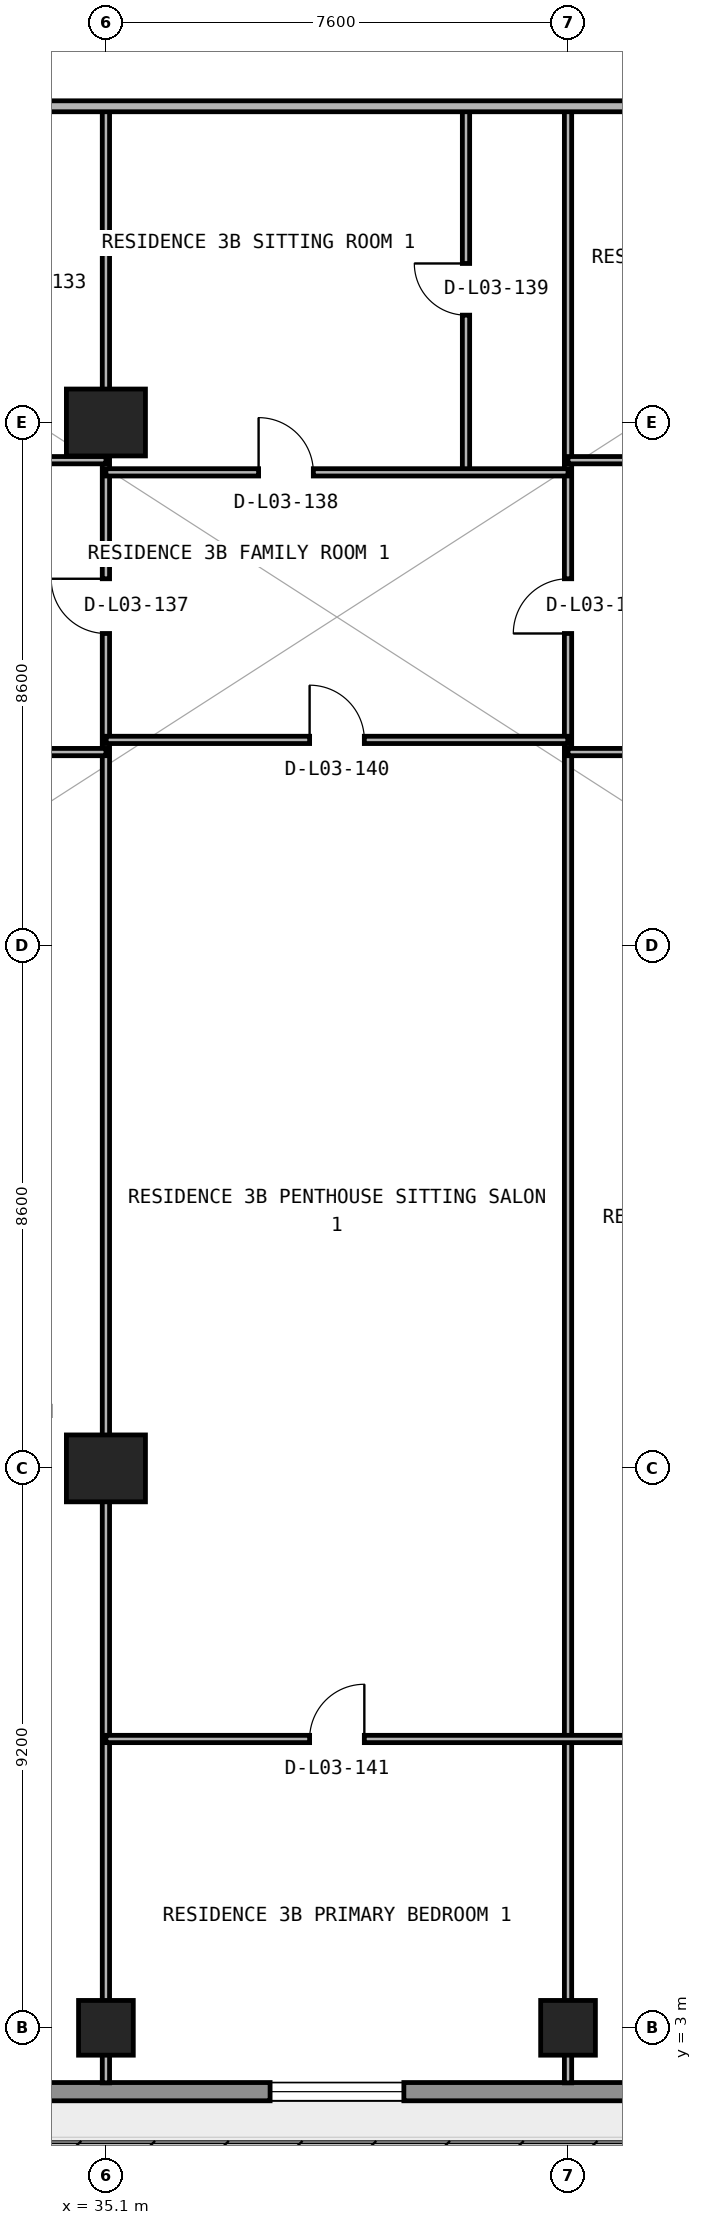
"""IFC4 building model, lengths in metres.
Left out: names, types, materials, properties, quantities, classifications, styles, units other than length and angle.
Written with IfcOpenShell. Run it as: python <this file> out.ifc"""

import sys

from ifc_helpers import new_model, si_unit, direction, frame, frame_2d, origin, origin_2d, place, context, subcontext, project, spatial, rectangle, circle, extrude, element, fill, save


model = new_model("IFC4")
c1 = context("Model", 3, precision=1e-05, world=origin(), true_north=direction((0.0, 1.0)))
c2 = subcontext(c1, "Body", "Model", "MODEL_VIEW")
j1 = project(units=[si_unit("LENGTHUNIT", "METRE"), si_unit("PLANEANGLEUNIT", "RADIAN")], contexts=[c1])
p1 = place(None, origin())
s1 = spatial("IfcSite", under=j1, at=p1, CompositionType="ELEMENT")
p2 = place(p1, origin())
s2 = spatial("IfcBuilding", under=s1, at=p2, CompositionType="ELEMENT")
p3 = place(p2, frame((0.0, 0.0, 15.0)))
s3 = spatial("IfcBuildingStorey", under=s2, at=p3, CompositionType="ELEMENT", Elevation=15.0)
for number, where, z_axis, x_axis in (
    (1, (35.1, 3.0, 0.0), (0.0, 0.0, 1.0), (1.0, 0.0, 0.0)),
    (2, (42.7, 3.0, 0.0), (0.0, 0.0, 1.0), (1.0, 0.0, 0.0)),
):
    element("IfcColumn", number, at=place(p3, frame(where, z_axis=z_axis, x_axis=x_axis)), inside=s3, PredefinedType="COLUMN", context=c2, shape_type="SweptSolid", body=[
        extrude(circle(Radius=0.45, at=origin_2d()), origin(), (0.0, 0.0, 1.0), 4.5),
    ])
for number, where, z_axis, x_axis in (
    (3, (35.1, 12.2, 0.0), (0.0, 0.0, 1.0), (1.0, 0.0, 0.0)),
    (4, (35.1, 29.4, 0.0), (0.0, 0.0, 1.0), (1.0, 0.0, 0.0)),
):
    element("IfcColumn", number, at=place(p3, frame(where, z_axis=z_axis, x_axis=x_axis)), inside=s3, PredefinedType="COLUMN", context=c2, shape_type="SweptSolid", body=[
        extrude(rectangle(XDim=1.3, YDim=1.1, at=origin_2d()), origin(), (0.0, 0.0, 1.0), 4.5),
    ])
p4 = place(p3, frame((76.8, 1.95, 0.0), z_axis=(0.0, 0.0, 1.0), x_axis=(-1.0, 0.0, 0.0)))
e5 = element("IfcWall", 5, at=p4, inside=s3, PredefinedType="STANDARD", context=c2, shape_type="SweptSolid", body=[
    extrude(rectangle(XDim=75.8, YDim=0.3, at=frame_2d((37.9, 0.0))), origin(), (0.0, 0.0, 1.0), 4.5),
])
p5 = place(p4, frame((69.775, 0.0, 0.85)))
e6 = element("IfcOpeningElement", 6, at=p5, cuts=e5, PredefinedType="OPENING", context=c2, shape_type="SweptSolid", body=[
    extrude(rectangle(XDim=3.0, YDim=2.4, at=frame_2d((1.5, 1.2))), frame((0.0, 0.16, 0.0), z_axis=(0.0, -1.0, 0.0), x_axis=(1.0, 0.0, 0.0)), (0.0, 0.0, 1.0), 0.32),
])
p6 = place(p4, frame((61.8, 0.0, 0.0)))
e7 = element("IfcOpeningElement", 7, at=p6, cuts=e5, PredefinedType="OPENING", context=c2, shape_type="SweptSolid", body=[
    extrude(rectangle(XDim=1.8, YDim=2.3, at=frame_2d((0.9, 1.15))), frame((0.0, 0.16, 0.0), z_axis=(0.0, -1.0, 0.0), x_axis=(1.0, 0.0, 0.0)), (0.0, 0.0, 1.0), 0.32),
])
p7 = place(p4, frame((53.2, 0.0, 0.85)))
e8 = element("IfcOpeningElement", 8, at=p7, cuts=e5, PredefinedType="OPENING", context=c2, shape_type="SweptSolid", body=[
    extrude(rectangle(XDim=2.2, YDim=1.55, at=frame_2d((1.1, 0.775))), frame((0.0, 0.16, 0.0), z_axis=(0.0, -1.0, 0.0), x_axis=(1.0, 0.0, 0.0)), (0.0, 0.0, 1.0), 0.32),
])
p8 = place(p4, frame((45.0, 0.0, 0.0)))
e9 = element("IfcOpeningElement", 9, at=p8, cuts=e5, PredefinedType="OPENING", context=c2, shape_type="SweptSolid", body=[
    extrude(rectangle(XDim=1.8, YDim=2.3, at=frame_2d((0.9, 1.15))), frame((0.0, 0.16, 0.0), z_axis=(0.0, -1.0, 0.0), x_axis=(1.0, 0.0, 0.0)), (0.0, 0.0, 1.0), 0.32),
])
p9 = place(p4, frame((36.8, 0.0, 0.85)))
e10 = element("IfcOpeningElement", 10, at=p9, cuts=e5, PredefinedType="OPENING", context=c2, shape_type="SweptSolid", body=[
    extrude(rectangle(XDim=2.2, YDim=1.55, at=frame_2d((1.1, 0.775))), frame((0.0, 0.16, 0.0), z_axis=(0.0, -1.0, 0.0), x_axis=(1.0, 0.0, 0.0)), (0.0, 0.0, 1.0), 0.32),
])
p10 = place(p4, frame((28.8, 0.0, 0.85)))
e11 = element("IfcOpeningElement", 11, at=p10, cuts=e5, PredefinedType="OPENING", context=c2, shape_type="SweptSolid", body=[
    extrude(rectangle(XDim=2.2, YDim=1.55, at=frame_2d((1.1, 0.775))), frame((0.0, 0.16, 0.0), z_axis=(0.0, -1.0, 0.0), x_axis=(1.0, 0.0, 0.0)), (0.0, 0.0, 1.0), 0.32),
])
p11 = place(p4, frame((12.025, 0.0, 0.0)))
e12 = element("IfcOpeningElement", 12, at=p11, cuts=e5, PredefinedType="OPENING", context=c2, shape_type="SweptSolid", body=[
    extrude(rectangle(XDim=1.8, YDim=2.3, at=frame_2d((0.9, 1.15))), frame((0.0, 0.16, 0.0), z_axis=(0.0, -1.0, 0.0), x_axis=(1.0, 0.0, 0.0)), (0.0, 0.0, 1.0), 0.32),
])
p12 = place(p3, frame((35.1, 2.095, 0.0), z_axis=(0.0, 0.0, 1.0), x_axis=(0.0, 1.0, 0.0)))
e13 = element("IfcWall", 13, at=p12, inside=s3, PredefinedType="PARTITIONING", context=c2, shape_type="SweptSolid", body=[
    extrude(rectangle(XDim=32.505, YDim=0.12, at=frame_2d((16.252, 0.0))), origin(), (0.0, 0.0, 1.0), 3.464),
])
p13 = place(p12, frame((23.835, 0.0, 0.0)))
e14 = element("IfcOpeningElement", 14, at=p13, cuts=e13, PredefinedType="OPENING", context=c2, shape_type="SweptSolid", body=[
    extrude(rectangle(XDim=0.9, YDim=2.15, at=frame_2d((0.45, 1.075))), frame((0.0, 0.07, 0.0), z_axis=(0.0, -1.0, 0.0), x_axis=(1.0, 0.0, 0.0)), (0.0, 0.0, 1.0), 0.14),
])
p14 = place(p3, frame((41.022, 28.58, 0.0), z_axis=(0.0, 0.0, 1.0), x_axis=(0.0, 1.0, 0.0)))
e15 = element("IfcWall", 15, at=p14, inside=s3, PredefinedType="PARTITIONING", context=c2, shape_type="SweptSolid", body=[
    extrude(rectangle(XDim=6.02, YDim=0.12, at=frame_2d((3.01, 0.0))), origin(), (0.0, 0.0, 1.0), 4.5),
])
p15 = place(p14, frame((2.585, 0.0, 0.0)))
e16 = element("IfcOpeningElement", 16, at=p15, cuts=e15, PredefinedType="OPENING", context=c2, shape_type="SweptSolid", body=[
    extrude(rectangle(XDim=0.85, YDim=2.1, at=frame_2d((0.425, 1.05))), frame((0.0, 0.07, 0.0), z_axis=(0.0, -1.0, 0.0), x_axis=(1.0, 0.0, 0.0)), (0.0, 0.0, 1.0), 0.14),
])
p16 = place(p3, frame((42.7, 2.095, 0.0), z_axis=(0.0, 0.0, 1.0), x_axis=(0.0, 1.0, 0.0)))
e17 = element("IfcWall", 17, at=p16, inside=s3, PredefinedType="PARTITIONING", context=c2, shape_type="SweptSolid", body=[
    extrude(rectangle(XDim=32.505, YDim=0.12, at=frame_2d((16.252, 0.0))), origin(), (0.0, 0.0, 1.0), 4.5),
])
p17 = place(p16, frame((23.835, 0.0, 0.0)))
e18 = element("IfcOpeningElement", 18, at=p17, cuts=e17, PredefinedType="OPENING", context=c2, shape_type="SweptSolid", body=[
    extrude(rectangle(XDim=0.9, YDim=2.15, at=frame_2d((0.45, 1.075))), frame((0.0, 0.07, 0.0), z_axis=(0.0, -1.0, 0.0), x_axis=(1.0, 0.0, 0.0)), (0.0, 0.0, 1.0), 0.14),
])
p18 = place(p3, frame((35.1, 7.75, 0.0), z_axis=(0.0, 0.0, 1.0), x_axis=(1.0, 0.0, 0.0)))
e19 = element("IfcWall", 19, at=p18, inside=s3, PredefinedType="PARTITIONING", context=c2, shape_type="SweptSolid", body=[
    extrude(rectangle(XDim=16.0, YDim=0.12, at=frame_2d((8.0, 0.0))), origin(), (0.0, 0.0, 1.0), 4.5),
])
p19 = place(p18, frame((3.35, 0.0, 0.0)))
e20 = element("IfcOpeningElement", 20, at=p19, cuts=e19, PredefinedType="OPENING", context=c2, shape_type="SweptSolid", body=[
    extrude(rectangle(XDim=0.9, YDim=2.15, at=frame_2d((0.45, 1.075))), frame((0.0, 0.07, 0.0), z_axis=(0.0, -1.0, 0.0), x_axis=(1.0, 0.0, 0.0)), (0.0, 0.0, 1.0), 0.14),
])
p20 = place(p18, frame((11.35, 0.0, 0.0)))
e21 = element("IfcOpeningElement", 21, at=p20, cuts=e19, PredefinedType="OPENING", context=c2, shape_type="SweptSolid", body=[
    extrude(rectangle(XDim=0.9, YDim=2.15, at=frame_2d((0.45, 1.075))), frame((0.0, 0.07, 0.0), z_axis=(0.0, -1.0, 0.0), x_axis=(1.0, 0.0, 0.0)), (0.0, 0.0, 1.0), 0.14),
])
p21 = place(p3, frame((26.7, 23.98, 0.0), z_axis=(0.0, 0.0, 1.0), x_axis=(1.0, 0.0, 0.0)))
e22 = element("IfcWall", 22, at=p21, inside=s3, PredefinedType="PARTITIONING", context=c2, shape_type="SweptSolid", body=[
    extrude(rectangle(XDim=8.4, YDim=0.12, at=frame_2d((4.2, 0.0))), origin(), (0.0, 0.0, 1.0), 4.5),
])
p22 = place(p21, frame((1.314, 0.0, 0.0)))
e23 = element("IfcOpeningElement", 23, at=p22, cuts=e22, PredefinedType="OPENING", context=c2, shape_type="SweptSolid", body=[
    extrude(rectangle(XDim=0.9, YDim=2.15, at=frame_2d((0.45, 1.075))), frame((0.0, 0.07, 0.0), z_axis=(0.0, -1.0, 0.0), x_axis=(1.0, 0.0, 0.0)), (0.0, 0.0, 1.0), 0.14),
])
p23 = place(p3, frame((42.7, 23.98, 0.0), z_axis=(0.0, 0.0, 1.0), x_axis=(1.0, 0.0, 0.0)))
e24 = element("IfcWall", 24, at=p23, inside=s3, PredefinedType="PARTITIONING", context=c2, shape_type="SweptSolid", body=[
    extrude(rectangle(XDim=8.4, YDim=0.12, at=frame_2d((4.2, 0.0))), origin(), (0.0, 0.0, 1.0), 4.5),
])
p24 = place(p23, frame((3.75, 0.0, 0.0)))
e25 = element("IfcOpeningElement", 25, at=p24, cuts=e24, PredefinedType="OPENING", context=c2, shape_type="SweptSolid", body=[
    extrude(rectangle(XDim=0.9, YDim=2.15, at=frame_2d((0.45, 1.075))), frame((0.0, 0.07, 0.0), z_axis=(0.0, -1.0, 0.0), x_axis=(1.0, 0.0, 0.0)), (0.0, 0.0, 1.0), 0.14),
])
p25 = place(p3, frame((35.105, 24.18, 0.0), z_axis=(0.0, 0.0, 1.0), x_axis=(1.0, 0.0, 0.0)))
e26 = element("IfcWall", 26, at=p25, inside=s3, PredefinedType="PARTITIONING", context=c2, shape_type="SweptSolid", body=[
    extrude(rectangle(XDim=7.59, YDim=0.12, at=frame_2d((3.795, 0.0))), origin(), (0.0, 0.0, 1.0), 4.5),
])
p26 = place(p25, frame((3.345, 0.0, 0.0)))
e27 = element("IfcOpeningElement", 27, at=p26, cuts=e26, PredefinedType="OPENING", context=c2, shape_type="SweptSolid", body=[
    extrude(rectangle(XDim=0.9, YDim=2.15, at=frame_2d((0.45, 1.075))), frame((0.0, 0.07, 0.0), z_axis=(0.0, -1.0, 0.0), x_axis=(1.0, 0.0, 0.0)), (0.0, 0.0, 1.0), 0.14),
])
p27 = place(p3, frame((35.1, 28.58, 0.0), z_axis=(0.0, 0.0, 1.0), x_axis=(1.0, 0.0, 0.0)))
e28 = element("IfcWall", 28, at=p27, inside=s3, PredefinedType="PARTITIONING", context=c2, shape_type="SweptSolid", body=[
    extrude(rectangle(XDim=7.6, YDim=0.12, at=frame_2d((3.8, 0.0))), origin(), (0.0, 0.0, 1.0), 4.5),
])
p28 = place(p27, frame((2.511, 0.0, 0.0)))
e29 = element("IfcOpeningElement", 29, at=p28, cuts=e28, PredefinedType="OPENING", context=c2, shape_type="SweptSolid", body=[
    extrude(rectangle(XDim=0.9, YDim=2.15, at=frame_2d((0.45, 1.075))), frame((0.0, 0.07, 0.0), z_axis=(0.0, -1.0, 0.0), x_axis=(1.0, 0.0, 0.0)), (0.0, 0.0, 1.0), 0.14),
])
p29 = place(p3, frame((26.7, 28.78, 0.0), z_axis=(0.0, 0.0, 1.0), x_axis=(1.0, 0.0, 0.0)))
e30 = element("IfcWall", 30, at=p29, inside=s3, PredefinedType="PARTITIONING", context=c2, shape_type="SweptSolid", body=[
    extrude(rectangle(XDim=8.4, YDim=0.12, at=frame_2d((4.2, 0.0))), origin(), (0.0, 0.0, 1.0), 4.5),
])
p30 = place(p29, frame((1.314, 0.0, 0.0)))
e31 = element("IfcOpeningElement", 31, at=p30, cuts=e30, PredefinedType="OPENING", context=c2, shape_type="SweptSolid", body=[
    extrude(rectangle(XDim=0.9, YDim=2.15, at=frame_2d((0.45, 1.075))), frame((0.0, 0.07, 0.0), z_axis=(0.0, -1.0, 0.0), x_axis=(1.0, 0.0, 0.0)), (0.0, 0.0, 1.0), 0.14),
])
p31 = place(p3, frame((42.7, 28.78, 0.0), z_axis=(0.0, 0.0, 1.0), x_axis=(1.0, 0.0, 0.0)))
e32 = element("IfcWall", 32, at=p31, inside=s3, PredefinedType="PARTITIONING", context=c2, shape_type="SweptSolid", body=[
    extrude(rectangle(XDim=8.4, YDim=0.12, at=frame_2d((4.2, 0.0))), origin(), (0.0, 0.0, 1.0), 4.5),
])
p32 = place(p31, frame((2.926, 0.0, 0.0)))
e33 = element("IfcOpeningElement", 33, at=p32, cuts=e32, PredefinedType="OPENING", context=c2, shape_type="SweptSolid", body=[
    extrude(rectangle(XDim=0.9, YDim=2.15, at=frame_2d((0.45, 1.075))), frame((0.0, 0.07, 0.0), z_axis=(0.0, -1.0, 0.0), x_axis=(1.0, 0.0, 0.0)), (0.0, 0.0, 1.0), 0.14),
])
p33 = place(p3, frame((1.295, 34.6, 0.0), z_axis=(0.0, 0.0, 1.0), x_axis=(1.0, 0.0, 0.0)))
e34 = element("IfcWall", 34, at=p33, inside=s3, PredefinedType="PARTITIONING", context=c2, shape_type="SweptSolid", body=[
    extrude(rectangle(XDim=75.21, YDim=0.18, at=frame_2d((37.605, 0.0))), origin(), (0.0, 0.0, 1.0), 4.5),
])
p34 = place(p33, frame((3.778, 0.0, 0.0)))
e35 = element("IfcOpeningElement", 35, at=p34, cuts=e34, PredefinedType="OPENING", context=c2, shape_type="SweptSolid", body=[
    extrude(rectangle(XDim=1.05, YDim=2.15, at=frame_2d((0.525, 1.075))), frame((0.0, 0.1, 0.0), z_axis=(0.0, -1.0, 0.0), x_axis=(1.0, 0.0, 0.0)), (0.0, 0.0, 1.0), 0.2),
])
p35 = place(p33, frame((11.555, 0.0, 0.0)))
e36 = element("IfcOpeningElement", 36, at=p35, cuts=e34, PredefinedType="OPENING", context=c2, shape_type="SweptSolid", body=[
    extrude(rectangle(XDim=1.0, YDim=2.2, at=frame_2d((0.5, 1.1))), frame((0.0, 0.1, 0.0), z_axis=(0.0, -1.0, 0.0), x_axis=(1.0, 0.0, 0.0)), (0.0, 0.0, 1.0), 0.2),
])
p36 = place(p33, frame((28.263, 0.0, 0.0)))
e37 = element("IfcOpeningElement", 37, at=p36, cuts=e34, PredefinedType="OPENING", context=c2, shape_type="SweptSolid", body=[
    extrude(rectangle(XDim=1.0, YDim=2.2, at=frame_2d((0.5, 1.1))), frame((0.0, 0.1, 0.0), z_axis=(0.0, -1.0, 0.0), x_axis=(1.0, 0.0, 0.0)), (0.0, 0.0, 1.0), 0.2),
])
p37 = place(p33, frame((61.982, 0.0, 0.0)))
e38 = element("IfcOpeningElement", 38, at=p37, cuts=e34, PredefinedType="OPENING", context=c2, shape_type="SweptSolid", body=[
    extrude(rectangle(XDim=1.05, YDim=2.15, at=frame_2d((0.525, 1.075))), frame((0.0, 0.1, 0.0), z_axis=(0.0, -1.0, 0.0), x_axis=(1.0, 0.0, 0.0)), (0.0, 0.0, 1.0), 0.2),
])
p38 = place(p9, origin())
e39 = element("IfcWindow", 39, at=p38, inside=s3, PartitioningType="SINGLE_PANEL", PredefinedType="WINDOW", context=c2, shape_type="SweptSolid", body=[
    extrude(rectangle(XDim=2.2, YDim=1.55, at=frame_2d((1.1, 0.775))), frame((0.0, 0.03, 0.0), z_axis=(0.0, -1.0, 0.0), x_axis=(1.0, 0.0, 0.0)), (0.0, 0.0, 1.0), 0.06),
])
fill(e10, e39)
p39 = place(p13, origin())
e40 = element("IfcDoor", 40, at=p39, inside=s3, OperationType="SINGLE_SWING_RIGHT", PredefinedType="DOOR", context=c2, shape_type="SweptSolid", body=[
    extrude(rectangle(XDim=0.9, YDim=2.15, at=frame_2d((0.45, 1.075))), frame((0.0, 0.025, 0.0), z_axis=(0.0, -1.0, 0.0), x_axis=(1.0, 0.0, 0.0)), (0.0, 0.0, 1.0), 0.05),
])
fill(e14, e40)
p40 = place(p28, origin())
e41 = element("IfcDoor", 41, at=p40, inside=s3, OperationType="SINGLE_SWING_LEFT", PredefinedType="DOOR", context=c2, shape_type="SweptSolid", body=[
    extrude(rectangle(XDim=0.9, YDim=2.15, at=frame_2d((0.45, 1.075))), frame((0.0, 0.025, 0.0), z_axis=(0.0, -1.0, 0.0), x_axis=(1.0, 0.0, 0.0)), (0.0, 0.0, 1.0), 0.05),
])
fill(e29, e41)
p41 = place(p15, origin())
e42 = element("IfcDoor", 42, at=p41, inside=s3, OperationType="SINGLE_SWING_RIGHT", PredefinedType="DOOR", context=c2, shape_type="SweptSolid", body=[
    extrude(rectangle(XDim=0.85, YDim=2.1, at=frame_2d((0.425, 1.05))), frame((0.0, 0.025, 0.0), z_axis=(0.0, -1.0, 0.0), x_axis=(1.0, 0.0, 0.0)), (0.0, 0.0, 1.0), 0.05),
])
fill(e16, e42)
p42 = place(p26, origin())
e43 = element("IfcDoor", 43, at=p42, inside=s3, OperationType="SINGLE_SWING_LEFT", PredefinedType="DOOR", context=c2, shape_type="SweptSolid", body=[
    extrude(rectangle(XDim=0.9, YDim=2.15, at=frame_2d((0.45, 1.075))), frame((0.0, 0.025, 0.0), z_axis=(0.0, -1.0, 0.0), x_axis=(1.0, 0.0, 0.0)), (0.0, 0.0, 1.0), 0.05),
])
fill(e27, e43)
p43 = place(p19, origin())
e44 = element("IfcDoor", 44, at=p43, inside=s3, OperationType="SINGLE_SWING_RIGHT", PredefinedType="DOOR", context=c2, shape_type="SweptSolid", body=[
    extrude(rectangle(XDim=0.9, YDim=2.15, at=frame_2d((0.45, 1.075))), frame((0.0, 0.025, 0.0), z_axis=(0.0, -1.0, 0.0), x_axis=(1.0, 0.0, 0.0)), (0.0, 0.0, 1.0), 0.05),
])
fill(e20, e44)
p44 = place(p17, origin())
e45 = element("IfcDoor", 45, at=p44, inside=s3, OperationType="SINGLE_SWING_LEFT", PredefinedType="DOOR", context=c2, shape_type="SweptSolid", body=[
    extrude(rectangle(XDim=0.9, YDim=2.15, at=frame_2d((0.45, 1.075))), frame((0.0, 0.025, 0.0), z_axis=(0.0, -1.0, 0.0), x_axis=(1.0, 0.0, 0.0)), (0.0, 0.0, 1.0), 0.05),
])
fill(e18, e45)
save(model, sys.argv[1])
